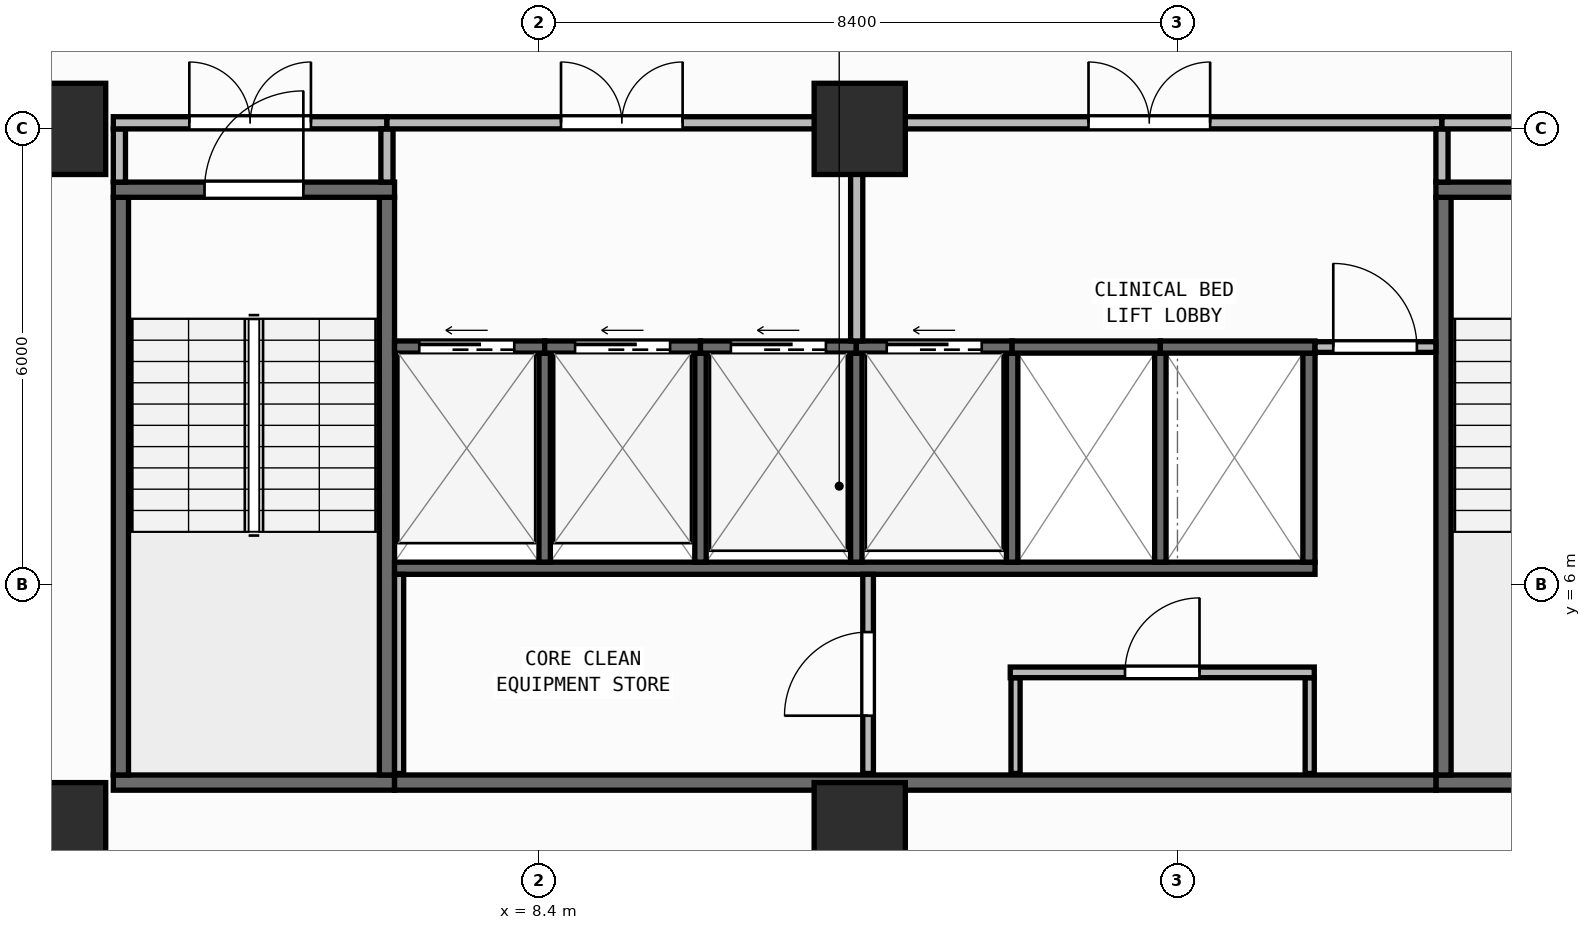
"""IFC4 building model, lengths in metres.
Left out: names, types, materials, properties, quantities, classifications, styles, units other than length and angle.
Written with IfcOpenShell. Run it as: python <this file> out.ifc"""

import sys

from ifc_helpers import new_model, si_unit, direction, frame, frame_2d, origin, origin_2d, place, context, subcontext, project, spatial, rectangle, extrude, element, fill, save


model = new_model("IFC4")
c1 = context("Model", 3, precision=1e-05, world=origin(), true_north=direction((0.0, 1.0)))
c2 = subcontext(c1, "Body", "Model", "MODEL_VIEW")
j1 = project(units=[si_unit("LENGTHUNIT", "METRE"), si_unit("PLANEANGLEUNIT", "RADIAN")], contexts=[c1])
p1 = place(None, origin())
s1 = spatial("IfcSite", under=j1, at=p1, CompositionType="ELEMENT")
p2 = place(p1, origin())
s2 = spatial("IfcBuilding", under=s1, at=p2, CompositionType="ELEMENT")
p3 = place(p2, frame((0.0, 0.0, 166.55)))
s3 = spatial("IfcBuildingStorey", under=s2, at=p3, CompositionType="ELEMENT", Elevation=166.55)
for number, where, z_axis, x_axis in (
    (1, (2.1, 2.8, 0.0), (0.0, 0.0, 1.0), (1.0, 0.0, 0.0)),
    (2, (12.62, 2.8, 0.0), (0.0, 0.0, 1.0), (1.0, 0.0, 0.0)),
    (3, (2.1, 12.0, 0.0), (0.0, 0.0, 1.0), (1.0, 0.0, 0.0)),
    (4, (12.62, 12.0, 0.0), (0.0, 0.0, 1.0), (1.0, 0.0, 0.0)),
):
    element("IfcColumn", number, at=place(p3, frame(where, z_axis=z_axis, x_axis=x_axis)), inside=s3, PredefinedType="COLUMN", context=c2, shape_type="SweptSolid", body=[
        extrude(rectangle(XDim=1.2, YDim=1.2, at=origin_2d()), origin(), (0.0, 0.0, 1.0), 3.95),
    ])
p4 = place(p3, frame((2.76, 0.173, 0.0), z_axis=(0.0, 0.0, 1.0), x_axis=(0.996857931723, 0.079210251617, 0.0)))
e5 = element("IfcWall", 5, at=p4, inside=s3, PredefinedType="STANDARD", context=c2, shape_type="SweptSolid", body=[
    extrude(rectangle(XDim=51.442, YDim=0.26, at=frame_2d((25.721, 0.0))), origin(), (0.0, 0.0, 1.0), 3.71),
])
p5 = place(p4, frame((24.521, 0.0, 0.9)))
e6 = element("IfcOpeningElement", 6, at=p5, cuts=e5, PredefinedType="OPENING", context=c2, shape_type="SweptSolid", body=[
    extrude(rectangle(XDim=2.4, YDim=1.65, at=frame_2d((1.2, 0.825))), frame((0.0, 0.14, 0.0), z_axis=(0.0, -1.0, 0.0), x_axis=(1.0, 0.0, 0.0)), (0.0, 0.0, 1.0), 0.28),
])
p6 = place(p3, frame((2.8, 3.4, 0.0), z_axis=(0.0, 0.0, 1.0), x_axis=(1.0, 0.0, 0.0)))
e7 = element("IfcWall", 7, at=p6, inside=s3, PredefinedType="SHEAR", context=c2, shape_type="SweptSolid", body=[
    extrude(rectangle(XDim=3.7, YDim=0.2, at=frame_2d((1.85, 0.0))), origin(), (0.0, 0.0, 1.0), 3.71),
])
for number, where, z_axis, x_axis in (
    (8, (2.9, 3.5, 0.0), (0.0, 0.0, 1.0), (0.0, 1.0, 0.0)),
    (9, (6.4, 3.5, 0.0), (0.0, 0.0, 1.0), (0.0, 1.0, 0.0)),
):
    element("IfcWall", number, at=place(p3, frame(where, z_axis=z_axis, x_axis=x_axis)), inside=s3, PredefinedType="SHEAR", context=c2, shape_type="SweptSolid", body=[
        extrude(rectangle(XDim=7.6, YDim=0.2, at=frame_2d((3.8, 0.0))), origin(), (0.0, 0.0, 1.0), 3.71),
    ])
p7 = place(p3, frame((2.8, 11.2, 0.0), z_axis=(0.0, 0.0, 1.0), x_axis=(1.0, 0.0, 0.0)))
e10 = element("IfcWall", 10, at=p7, inside=s3, PredefinedType="SHEAR", context=c2, shape_type="SweptSolid", body=[
    extrude(rectangle(XDim=3.7, YDim=0.2, at=frame_2d((1.85, 0.0))), origin(), (0.0, 0.0, 1.0), 3.71),
])
p8 = place(p7, frame((1.2, 0.0, 0.0)))
e11 = element("IfcOpeningElement", 11, at=p8, cuts=e10, PredefinedType="OPENING", context=c2, shape_type="SweptSolid", body=[
    extrude(rectangle(XDim=1.3, YDim=2.15, at=frame_2d((0.65, 1.075))), frame((0.0, 0.11, 0.0), z_axis=(0.0, -1.0, 0.0), x_axis=(1.0, 0.0, 0.0)), (0.0, 0.0, 1.0), 0.22),
])
p9 = place(p3, frame((20.2, 3.4, 0.0), z_axis=(0.0, 0.0, 1.0), x_axis=(1.0, 0.0, 0.0)))
e12 = element("IfcWall", 12, at=p9, inside=s3, PredefinedType="SHEAR", context=c2, shape_type="SweptSolid", body=[
    extrude(rectangle(XDim=3.7, YDim=0.2, at=frame_2d((1.85, 0.0))), origin(), (0.0, 0.0, 1.0), 3.71),
])
p10 = place(p3, frame((20.3, 3.5, 0.0), z_axis=(0.0, 0.0, 1.0), x_axis=(0.0, 1.0, 0.0)))
e13 = element("IfcWall", 13, at=p10, inside=s3, PredefinedType="SHEAR", context=c2, shape_type="SweptSolid", body=[
    extrude(rectangle(XDim=7.6, YDim=0.2, at=frame_2d((3.8, 0.0))), origin(), (0.0, 0.0, 1.0), 3.71),
])
p11 = place(p3, frame((20.2, 11.2, 0.0), z_axis=(0.0, 0.0, 1.0), x_axis=(1.0, 0.0, 0.0)))
e14 = element("IfcWall", 14, at=p11, inside=s3, PredefinedType="SHEAR", context=c2, shape_type="SweptSolid", body=[
    extrude(rectangle(XDim=3.7, YDim=0.2, at=frame_2d((1.85, 0.0))), origin(), (0.0, 0.0, 1.0), 3.71),
])
p12 = place(p11, frame((1.2, 0.0, 0.0)))
e15 = element("IfcOpeningElement", 15, at=p12, cuts=e14, PredefinedType="OPENING", context=c2, shape_type="SweptSolid", body=[
    extrude(rectangle(XDim=1.3, YDim=2.15, at=frame_2d((0.65, 1.075))), frame((0.0, 0.11, 0.0), z_axis=(0.0, -1.0, 0.0), x_axis=(1.0, 0.0, 0.0)), (0.0, 0.0, 1.0), 0.22),
])
p13 = place(p3, frame((6.5, 3.4, 0.0), z_axis=(0.0, 0.0, 1.0), x_axis=(1.0, 0.0, 0.0)))
e16 = element("IfcWall", 16, at=p13, inside=s3, PredefinedType="SHEAR", context=c2, shape_type="SweptSolid", body=[
    extrude(rectangle(XDim=13.7, YDim=0.2, at=frame_2d((6.85, 0.0))), origin(), (0.0, 0.0, 1.0), 3.71),
])
p14 = place(p3, frame((6.5, 6.22, 0.0), z_axis=(0.0, 0.0, 1.0), x_axis=(1.0, 0.0, 0.0)))
e17 = element("IfcWall", 17, at=p14, inside=s3, PredefinedType="SHEAR", context=c2, shape_type="SweptSolid", body=[
    extrude(rectangle(XDim=12.11, YDim=0.16, at=frame_2d((6.055, 0.0))), origin(), (0.0, 0.0, 1.0), 3.71),
])
p15 = place(p3, frame((18.53, 6.3, 0.0), z_axis=(0.0, 0.0, 1.0), x_axis=(0.0, 1.0, 0.0)))
e18 = element("IfcWall", 18, at=p15, inside=s3, PredefinedType="SHEAR", context=c2, shape_type="SweptSolid", body=[
    extrude(rectangle(XDim=2.75, YDim=0.16, at=frame_2d((1.375, 0.0))), origin(), (0.0, 0.0, 1.0), 3.71),
])
for number, where, z_axis, x_axis in (
    (19, (8.475, 6.3, 0.0), (0.0, 0.0, 1.0), (0.0, 1.0, 0.0)),
    (20, (10.525, 6.3, 0.0), (0.0, 0.0, 1.0), (0.0, 1.0, 0.0)),
    (21, (12.575, 6.3, 0.0), (0.0, 0.0, 1.0), (0.0, 1.0, 0.0)),
    (22, (14.625, 6.3, 0.0), (0.0, 0.0, 1.0), (0.0, 1.0, 0.0)),
    (23, (16.575, 6.3, 0.0), (0.0, 0.0, 1.0), (0.0, 1.0, 0.0)),
):
    element("IfcWall", number, at=place(p3, frame(where, z_axis=z_axis, x_axis=x_axis)), inside=s3, PredefinedType="SHEAR", context=c2, shape_type="SweptSolid", body=[
        extrude(rectangle(XDim=2.75, YDim=0.15, at=frame_2d((1.375, 0.0))), origin(), (0.0, 0.0, 1.0), 3.71),
    ])
p16 = place(p3, frame((6.5, 9.13, 0.0), z_axis=(0.0, 0.0, 1.0), x_axis=(1.0, 0.0, 0.0)))
e24 = element("IfcWall", 24, at=p16, inside=s3, PredefinedType="SHEAR", context=c2, shape_type="SweptSolid", body=[
    extrude(rectangle(XDim=1.975, YDim=0.16, at=frame_2d((0.988, 0.0))), origin(), (0.0, 0.0, 1.0), 3.71),
])
p17 = place(p16, frame((0.325, 0.0, 0.0)))
e25 = element("IfcOpeningElement", 25, at=p17, cuts=e24, PredefinedType="OPENING", context=c2, shape_type="SweptSolid", body=[
    extrude(rectangle(XDim=1.25, YDim=2.15, at=frame_2d((0.625, 1.075))), frame((0.0, 0.09, 0.0), z_axis=(0.0, -1.0, 0.0), x_axis=(1.0, 0.0, 0.0)), (0.0, 0.0, 1.0), 0.18),
])
p18 = place(p3, frame((8.475, 9.13, 0.0), z_axis=(0.0, 0.0, 1.0), x_axis=(1.0, 0.0, 0.0)))
e26 = element("IfcWall", 26, at=p18, inside=s3, PredefinedType="SHEAR", context=c2, shape_type="SweptSolid", body=[
    extrude(rectangle(XDim=2.05, YDim=0.16, at=frame_2d((1.025, 0.0))), origin(), (0.0, 0.0, 1.0), 3.71),
])
p19 = place(p18, frame((0.4, 0.0, 0.0)))
e27 = element("IfcOpeningElement", 27, at=p19, cuts=e26, PredefinedType="OPENING", context=c2, shape_type="SweptSolid", body=[
    extrude(rectangle(XDim=1.25, YDim=2.15, at=frame_2d((0.625, 1.075))), frame((0.0, 0.09, 0.0), z_axis=(0.0, -1.0, 0.0), x_axis=(1.0, 0.0, 0.0)), (0.0, 0.0, 1.0), 0.18),
])
p20 = place(p3, frame((10.525, 9.13, 0.0), z_axis=(0.0, 0.0, 1.0), x_axis=(1.0, 0.0, 0.0)))
e28 = element("IfcWall", 28, at=p20, inside=s3, PredefinedType="SHEAR", context=c2, shape_type="SweptSolid", body=[
    extrude(rectangle(XDim=2.05, YDim=0.16, at=frame_2d((1.025, 0.0))), origin(), (0.0, 0.0, 1.0), 3.71),
])
p21 = place(p20, frame((0.4, 0.0, 0.0)))
e29 = element("IfcOpeningElement", 29, at=p21, cuts=e28, PredefinedType="OPENING", context=c2, shape_type="SweptSolid", body=[
    extrude(rectangle(XDim=1.25, YDim=2.15, at=frame_2d((0.625, 1.075))), frame((0.0, 0.09, 0.0), z_axis=(0.0, -1.0, 0.0), x_axis=(1.0, 0.0, 0.0)), (0.0, 0.0, 1.0), 0.18),
])
p22 = place(p3, frame((12.575, 9.13, 0.0), z_axis=(0.0, 0.0, 1.0), x_axis=(1.0, 0.0, 0.0)))
e30 = element("IfcWall", 30, at=p22, inside=s3, PredefinedType="SHEAR", context=c2, shape_type="SweptSolid", body=[
    extrude(rectangle(XDim=2.05, YDim=0.16, at=frame_2d((1.025, 0.0))), origin(), (0.0, 0.0, 1.0), 3.71),
])
p23 = place(p22, frame((0.4, 0.0, 0.0)))
e31 = element("IfcOpeningElement", 31, at=p23, cuts=e30, PredefinedType="OPENING", context=c2, shape_type="SweptSolid", body=[
    extrude(rectangle(XDim=1.25, YDim=2.15, at=frame_2d((0.625, 1.075))), frame((0.0, 0.09, 0.0), z_axis=(0.0, -1.0, 0.0), x_axis=(1.0, 0.0, 0.0)), (0.0, 0.0, 1.0), 0.18),
])
p24 = place(p3, frame((14.625, 9.13, 0.0), z_axis=(0.0, 0.0, 1.0), x_axis=(1.0, 0.0, 0.0)))
e32 = element("IfcWall", 32, at=p24, inside=s3, PredefinedType="SHEAR", context=c2, shape_type="SweptSolid", body=[
    extrude(rectangle(XDim=1.95, YDim=0.16, at=frame_2d((0.975, 0.0))), origin(), (0.0, 0.0, 1.0), 3.71),
])
p25 = place(p3, frame((16.575, 9.13, 0.0), z_axis=(0.0, 0.0, 1.0), x_axis=(1.0, 0.0, 0.0)))
e33 = element("IfcWall", 33, at=p25, inside=s3, PredefinedType="SHEAR", context=c2, shape_type="SweptSolid", body=[
    extrude(rectangle(XDim=2.035, YDim=0.16, at=frame_2d((1.018, 0.0))), origin(), (0.0, 0.0, 1.0), 3.71),
])
p26 = place(p3, frame((6.56, 3.52, 0.0), z_axis=(0.0, 0.0, 1.0), x_axis=(0.0, 1.0, 0.0)))
e34 = element("IfcWall", 34, at=p26, inside=s3, PredefinedType="PARTITIONING", context=c2, shape_type="SweptSolid", body=[
    extrude(rectangle(XDim=2.62, YDim=0.12, at=frame_2d((1.31, 0.0))), origin(), (0.0, 0.0, 1.0), 3.71),
])
p27 = place(p3, frame((12.73, 3.52, 0.0), z_axis=(0.0, 0.0, 1.0), x_axis=(0.0, 1.0, 0.0)))
e35 = element("IfcWall", 35, at=p27, inside=s3, PredefinedType="PARTITIONING", context=c2, shape_type="SweptSolid", body=[
    extrude(rectangle(XDim=2.62, YDim=0.14, at=frame_2d((1.31, 0.0))), origin(), (0.0, 0.0, 1.0), 3.71),
])
p28 = place(p27, frame((0.76, 0.0, 0.0)))
e36 = element("IfcOpeningElement", 36, at=p28, cuts=e35, PredefinedType="OPENING", context=c2, shape_type="SweptSolid", body=[
    extrude(rectangle(XDim=1.1, YDim=2.1, at=frame_2d((0.55, 1.05))), frame((0.0, 0.08, 0.0), z_axis=(0.0, -1.0, 0.0), x_axis=(1.0, 0.0, 0.0)), (0.0, 0.0, 1.0), 0.16),
])
for number, where, z_axis, x_axis in (
    (37, (14.67, 3.52, 0.0), (0.0, 0.0, 1.0), (0.0, 1.0, 0.0)),
    (38, (18.54, 3.52, 0.0), (0.0, 0.0, 1.0), (0.0, 1.0, 0.0)),
):
    element("IfcWall", number, at=place(p3, frame(where, z_axis=z_axis, x_axis=x_axis)), inside=s3, PredefinedType="PARTITIONING", context=c2, shape_type="SweptSolid", body=[
        extrude(rectangle(XDim=1.26, YDim=0.12, at=frame_2d((0.63, 0.0))), origin(), (0.0, 0.0, 1.0), 3.71),
    ])
p29 = place(p3, frame((14.6, 4.85, 0.0), z_axis=(0.0, 0.0, 1.0), x_axis=(1.0, 0.0, 0.0)))
e39 = element("IfcWall", 39, at=p29, inside=s3, PredefinedType="PARTITIONING", context=c2, shape_type="SweptSolid", body=[
    extrude(rectangle(XDim=4.0, YDim=0.14, at=frame_2d((2.0, 0.0))), origin(), (0.0, 0.0, 1.0), 3.71),
])
p30 = place(p29, frame((1.51, 0.0, 0.0)))
e40 = element("IfcOpeningElement", 40, at=p30, cuts=e39, PredefinedType="OPENING", context=c2, shape_type="SweptSolid", body=[
    extrude(rectangle(XDim=0.98, YDim=2.1, at=frame_2d((0.49, 1.05))), frame((0.0, 0.08, 0.0), z_axis=(0.0, -1.0, 0.0), x_axis=(1.0, 0.0, 0.0)), (0.0, 0.0, 1.0), 0.16),
])
p31 = place(p3, frame((18.61, 9.13, 0.0), z_axis=(0.0, 0.0, 1.0), x_axis=(1.0, 0.0, 0.0)))
e41 = element("IfcWall", 41, at=p31, inside=s3, PredefinedType="PARTITIONING", context=c2, shape_type="SweptSolid", body=[
    extrude(rectangle(XDim=1.59, YDim=0.14, at=frame_2d((0.795, 0.0))), origin(), (0.0, 0.0, 1.0), 3.71),
])
p32 = place(p31, frame((0.24, 0.0, 0.0)))
e42 = element("IfcOpeningElement", 42, at=p32, cuts=e41, PredefinedType="OPENING", context=c2, shape_type="SweptSolid", body=[
    extrude(rectangle(XDim=1.1, YDim=2.1, at=frame_2d((0.55, 1.05))), frame((0.0, 0.08, 0.0), z_axis=(0.0, -1.0, 0.0), x_axis=(1.0, 0.0, 0.0)), (0.0, 0.0, 1.0), 0.16),
])
p33 = place(p3, frame((2.88, 11.3, 0.0), z_axis=(0.0, 0.0, 1.0), x_axis=(0.0, 1.0, 0.0)))
e43 = element("IfcWall", 43, at=p33, inside=s3, PredefinedType="PARTITIONING", context=c2, shape_type="SweptSolid", body=[
    extrude(rectangle(XDim=0.7, YDim=0.16, at=frame_2d((0.35, 0.0))), origin(), (0.0, 0.0, 1.0), 3.71),
])
p34 = place(p3, frame((2.8, 12.08, 0.0), z_axis=(0.0, 0.0, 1.0), x_axis=(1.0, 0.0, 0.0)))
e44 = element("IfcWall", 44, at=p34, inside=s3, PredefinedType="PARTITIONING", context=c2, shape_type="SweptSolid", body=[
    extrude(rectangle(XDim=3.6, YDim=0.16, at=frame_2d((1.8, 0.0))), origin(), (0.0, 0.0, 1.0), 3.083),
])
p35 = place(p34, frame((1.0, 0.0, 0.0)))
e45 = element("IfcOpeningElement", 45, at=p35, cuts=e44, PredefinedType="OPENING", context=c2, shape_type="SweptSolid", body=[
    extrude(rectangle(XDim=1.6, YDim=2.05, at=frame_2d((0.8, 1.025))), frame((0.0, 0.09, 0.0), z_axis=(0.0, -1.0, 0.0), x_axis=(1.0, 0.0, 0.0)), (0.0, 0.0, 1.0), 0.18),
])
p36 = place(p3, frame((6.4, 11.3, 0.0), z_axis=(0.0, 0.0, 1.0), x_axis=(0.0, 1.0, 0.0)))
e46 = element("IfcWall", 46, at=p36, inside=s3, PredefinedType="PARTITIONING", context=c2, shape_type="SweptSolid", body=[
    extrude(rectangle(XDim=0.7, YDim=0.16, at=frame_2d((0.35, 0.0))), origin(), (0.0, 0.0, 1.0), 3.71),
])
p37 = place(p3, frame((6.4, 12.08, 0.0), z_axis=(0.0, 0.0, 1.0), x_axis=(1.0, 0.0, 0.0)))
e47 = element("IfcWall", 47, at=p37, inside=s3, PredefinedType="PARTITIONING", context=c2, shape_type="SweptSolid", body=[
    extrude(rectangle(XDim=6.18, YDim=0.16, at=frame_2d((3.09, 0.0))), origin(), (0.0, 0.0, 1.0), 3.083),
])
p38 = place(p37, frame((2.29, 0.0, 0.0)))
e48 = element("IfcOpeningElement", 48, at=p38, cuts=e47, PredefinedType="OPENING", context=c2, shape_type="SweptSolid", body=[
    extrude(rectangle(XDim=1.6, YDim=2.05, at=frame_2d((0.8, 1.025))), frame((0.0, 0.09, 0.0), z_axis=(0.0, -1.0, 0.0), x_axis=(1.0, 0.0, 0.0)), (0.0, 0.0, 1.0), 0.18),
])
p39 = place(p3, frame((12.58, 9.21, 0.0), z_axis=(0.0, 0.0, 1.0), x_axis=(0.0, 1.0, 0.0)))
e49 = element("IfcWall", 49, at=p39, inside=s3, PredefinedType="PARTITIONING", context=c2, shape_type="SweptSolid", body=[
    extrude(rectangle(XDim=2.79, YDim=0.16, at=frame_2d((1.395, 0.0))), origin(), (0.0, 0.0, 1.0), 3.71),
])
p40 = place(p3, frame((12.58, 12.08, 0.0), z_axis=(0.0, 0.0, 1.0), x_axis=(1.0, 0.0, 0.0)))
e50 = element("IfcWall", 50, at=p40, inside=s3, PredefinedType="PARTITIONING", context=c2, shape_type="SweptSolid", body=[
    extrude(rectangle(XDim=7.7, YDim=0.16, at=frame_2d((3.85, 0.0))), origin(), (0.0, 0.0, 1.0), 3.083),
])
p41 = place(p40, frame((3.05, 0.0, 0.0)))
e51 = element("IfcOpeningElement", 51, at=p41, cuts=e50, PredefinedType="OPENING", context=c2, shape_type="SweptSolid", body=[
    extrude(rectangle(XDim=1.6, YDim=2.05, at=frame_2d((0.8, 1.025))), frame((0.0, 0.09, 0.0), z_axis=(0.0, -1.0, 0.0), x_axis=(1.0, 0.0, 0.0)), (0.0, 0.0, 1.0), 0.18),
])
p42 = place(p3, frame((20.28, 11.3, 0.0), z_axis=(0.0, 0.0, 1.0), x_axis=(0.0, 1.0, 0.0)))
e52 = element("IfcWall", 52, at=p42, inside=s3, PredefinedType="PARTITIONING", context=c2, shape_type="SweptSolid", body=[
    extrude(rectangle(XDim=0.7, YDim=0.16, at=frame_2d((0.35, 0.0))), origin(), (0.0, 0.0, 1.0), 3.71),
])
p43 = place(p3, frame((20.28, 12.08, 0.0), z_axis=(0.0, 0.0, 1.0), x_axis=(1.0, 0.0, 0.0)))
e53 = element("IfcWall", 53, at=p43, inside=s3, PredefinedType="PARTITIONING", context=c2, shape_type="SweptSolid", body=[
    extrude(rectangle(XDim=3.62, YDim=0.16, at=frame_2d((1.81, 0.0))), origin(), (0.0, 0.0, 1.0), 3.083),
])
p44 = place(p43, frame((1.01, 0.0, 0.0)))
e54 = element("IfcOpeningElement", 54, at=p44, cuts=e53, PredefinedType="OPENING", context=c2, shape_type="SweptSolid", body=[
    extrude(rectangle(XDim=1.6, YDim=2.05, at=frame_2d((0.8, 1.025))), frame((0.0, 0.09, 0.0), z_axis=(0.0, -1.0, 0.0), x_axis=(1.0, 0.0, 0.0)), (0.0, 0.0, 1.0), 0.18),
])
p45 = place(p8, origin())
e55 = element("IfcDoor", 55, at=p45, inside=s3, OperationType="SINGLE_SWING_RIGHT", PredefinedType="DOOR", context=c2, shape_type="SweptSolid", body=[
    extrude(rectangle(XDim=1.3, YDim=2.15, at=frame_2d((0.65, 1.075))), frame((0.0, 0.025, 0.0), z_axis=(0.0, -1.0, 0.0), x_axis=(1.0, 0.0, 0.0)), (0.0, 0.0, 1.0), 0.05),
])
fill(e11, e55)
p46 = place(p17, origin())
e56 = element("IfcDoor", 56, at=p46, inside=s3, OperationType="SLIDING_TO_LEFT", PredefinedType="DOOR", context=c2, shape_type="SweptSolid", body=[
    extrude(rectangle(XDim=1.25, YDim=2.15, at=frame_2d((0.625, 1.075))), frame((0.0, 0.025, 0.0), z_axis=(0.0, -1.0, 0.0), x_axis=(1.0, 0.0, 0.0)), (0.0, 0.0, 1.0), 0.05),
])
fill(e25, e56)
p47 = place(p19, origin())
e57 = element("IfcDoor", 57, at=p47, inside=s3, OperationType="SLIDING_TO_LEFT", PredefinedType="DOOR", context=c2, shape_type="SweptSolid", body=[
    extrude(rectangle(XDim=1.25, YDim=2.15, at=frame_2d((0.625, 1.075))), frame((0.0, 0.025, 0.0), z_axis=(0.0, -1.0, 0.0), x_axis=(1.0, 0.0, 0.0)), (0.0, 0.0, 1.0), 0.05),
])
fill(e27, e57)
p48 = place(p21, origin())
e58 = element("IfcDoor", 58, at=p48, inside=s3, OperationType="SLIDING_TO_LEFT", PredefinedType="DOOR", context=c2, shape_type="SweptSolid", body=[
    extrude(rectangle(XDim=1.25, YDim=2.15, at=frame_2d((0.625, 1.075))), frame((0.0, 0.025, 0.0), z_axis=(0.0, -1.0, 0.0), x_axis=(1.0, 0.0, 0.0)), (0.0, 0.0, 1.0), 0.05),
])
fill(e29, e58)
p49 = place(p23, origin())
e59 = element("IfcDoor", 59, at=p49, inside=s3, OperationType="SLIDING_TO_LEFT", PredefinedType="DOOR", context=c2, shape_type="SweptSolid", body=[
    extrude(rectangle(XDim=1.25, YDim=2.15, at=frame_2d((0.625, 1.075))), frame((0.0, 0.025, 0.0), z_axis=(0.0, -1.0, 0.0), x_axis=(1.0, 0.0, 0.0)), (0.0, 0.0, 1.0), 0.05),
])
fill(e31, e59)
p50 = place(p28, origin())
e60 = element("IfcDoor", 60, at=p50, inside=s3, OperationType="SINGLE_SWING_LEFT", PredefinedType="DOOR", context=c2, shape_type="SweptSolid", body=[
    extrude(rectangle(XDim=1.1, YDim=2.1, at=frame_2d((0.55, 1.05))), frame((0.0, 0.025, 0.0), z_axis=(0.0, -1.0, 0.0), x_axis=(1.0, 0.0, 0.0)), (0.0, 0.0, 1.0), 0.05),
])
fill(e36, e60)
p51 = place(p30, origin())
e61 = element("IfcDoor", 61, at=p51, inside=s3, OperationType="SINGLE_SWING_RIGHT", PredefinedType="DOOR", context=c2, shape_type="SweptSolid", body=[
    extrude(rectangle(XDim=0.98, YDim=2.1, at=frame_2d((0.49, 1.05))), frame((0.0, 0.025, 0.0), z_axis=(0.0, -1.0, 0.0), x_axis=(1.0, 0.0, 0.0)), (0.0, 0.0, 1.0), 0.05),
])
fill(e40, e61)
p52 = place(p32, origin())
e62 = element("IfcDoor", 62, at=p52, inside=s3, OperationType="SINGLE_SWING_LEFT", PredefinedType="DOOR", context=c2, shape_type="SweptSolid", body=[
    extrude(rectangle(XDim=1.1, YDim=2.1, at=frame_2d((0.55, 1.05))), frame((0.0, 0.025, 0.0), z_axis=(0.0, -1.0, 0.0), x_axis=(1.0, 0.0, 0.0)), (0.0, 0.0, 1.0), 0.05),
])
fill(e42, e62)
p53 = place(p35, origin())
e63 = element("IfcDoor", 63, at=p53, inside=s3, OperationType="DOUBLE_DOOR_SINGLE_SWING", PredefinedType="DOOR", context=c2, shape_type="SweptSolid", body=[
    extrude(rectangle(XDim=1.6, YDim=2.05, at=frame_2d((0.8, 1.025))), frame((0.0, 0.025, 0.0), z_axis=(0.0, -1.0, 0.0), x_axis=(1.0, 0.0, 0.0)), (0.0, 0.0, 1.0), 0.05),
])
fill(e45, e63)
p54 = place(p38, origin())
e64 = element("IfcDoor", 64, at=p54, inside=s3, OperationType="DOUBLE_DOOR_SINGLE_SWING", PredefinedType="DOOR", context=c2, shape_type="SweptSolid", body=[
    extrude(rectangle(XDim=1.6, YDim=2.05, at=frame_2d((0.8, 1.025))), frame((0.0, 0.025, 0.0), z_axis=(0.0, -1.0, 0.0), x_axis=(1.0, 0.0, 0.0)), (0.0, 0.0, 1.0), 0.05),
])
fill(e48, e64)
p55 = place(p41, origin())
e65 = element("IfcDoor", 65, at=p55, inside=s3, OperationType="DOUBLE_DOOR_SINGLE_SWING", PredefinedType="DOOR", context=c2, shape_type="SweptSolid", body=[
    extrude(rectangle(XDim=1.6, YDim=2.05, at=frame_2d((0.8, 1.025))), frame((0.0, 0.025, 0.0), z_axis=(0.0, -1.0, 0.0), x_axis=(1.0, 0.0, 0.0)), (0.0, 0.0, 1.0), 0.05),
])
fill(e51, e65)
save(model, sys.argv[1])
